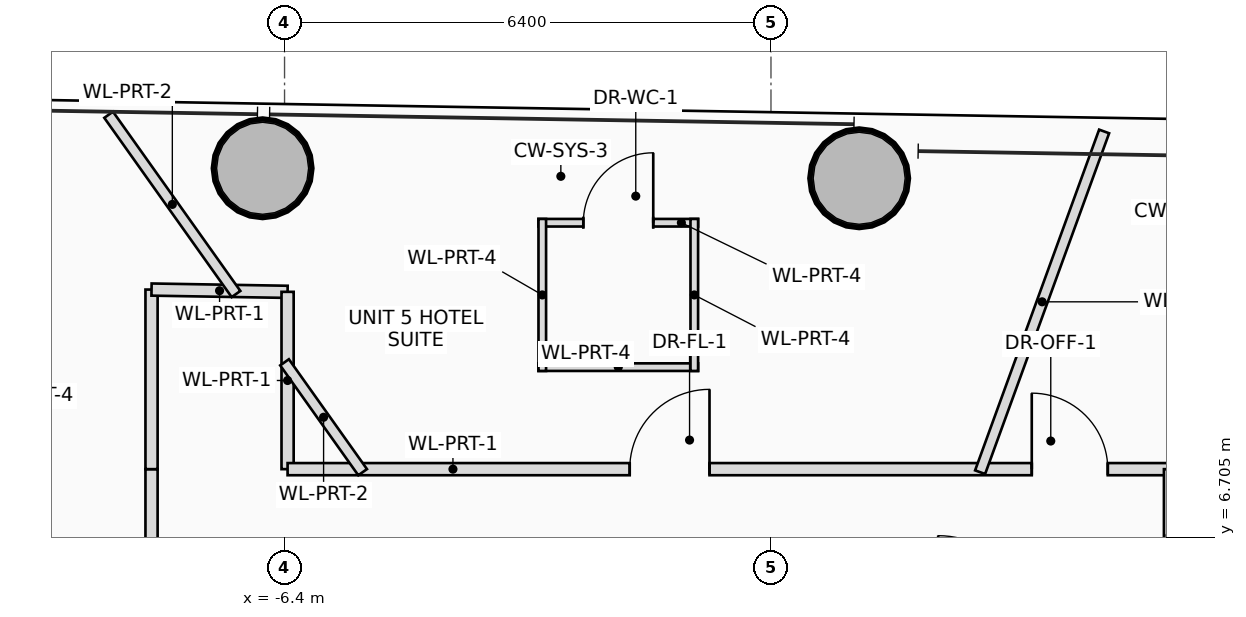
"""IFC4 building model, lengths in metres.
Left out: names, types, materials, properties, quantities, classifications, styles, units other than length and angle.
Written with IfcOpenShell. Run it as: python <this file> out.ifc"""

import sys

from ifc_helpers import new_model, si_unit, direction, frame, frame_2d, origin, origin_2d, place, context, subcontext, project, spatial, rectangle, hollow_circle, extrude, source, transform, mapped, element, fill, save


model = new_model("IFC4")
c1 = context("Model", 3, precision=1e-05, world=origin(), true_north=direction((0.0, 1.0)))
c2 = subcontext(c1, "Body", "Model", "MODEL_VIEW")
j1 = project(units=[si_unit("LENGTHUNIT", "METRE"), si_unit("PLANEANGLEUNIT", "RADIAN")], contexts=[c1])
p1 = place(None, origin())
s1 = spatial("IfcSite", under=j1, at=p1, CompositionType="ELEMENT")
p2 = place(p1, origin())
s2 = spatial("IfcBuilding", under=s1, at=p2, CompositionType="ELEMENT")
p3 = place(p2, frame((0.0, 0.0, 143.3)))
s3 = spatial("IfcBuildingStorey", under=s2, at=p3, CompositionType="ELEMENT", Elevation=143.3)
m1 = source(origin(), c2, "Body", "SweptSolid", [
    extrude(hollow_circle(Radius=0.65, WallThickness=0.045, at=origin_2d()), origin(), (0.0, 0.0, 1.0), 3.45),
])
for number, where, z_axis, x_axis in (
    (1, (1.16, 11.427, 0.0), (0.0, 0.0, 1.0), (1.0, 0.0, 0.0)),
    (2, (-6.688, 11.558, 0.0), (0.0, 0.0, 1.0), (1.0, 0.0, 0.0)),
):
    element("IfcColumn", number, at=place(p3, frame(where, z_axis=z_axis, x_axis=x_axis)), inside=s3, PredefinedType="COLUMN", context=c2, shape_type="MappedRepresentation", body=[
        mapped(m1, transform((0.0, 0.0, 0.0), scale=1.0)),
    ])
p4 = place(p3, frame((-3.059, 10.842, 0.0), z_axis=(0.0, 0.0, 1.0), x_axis=(1.0, 0.0, 0.0)))
e3 = element("IfcWall", 3, at=p4, inside=s3, PredefinedType="PARTITIONING", context=c2, shape_type="SweptSolid", body=[
    extrude(rectangle(XDim=2.1, YDim=0.1, at=frame_2d((1.05, 0.0))), origin(), (0.0, 0.0, 1.0), 3.25),
])
p5 = place(p4, frame((0.59, 0.0, 0.0)))
e4 = element("IfcOpeningElement", 4, at=p5, cuts=e3, PredefinedType="OPENING", context=c2, shape_type="SweptSolid", body=[
    extrude(rectangle(XDim=0.92, YDim=2.1, at=frame_2d((0.46, 1.05))), frame((0.0, 0.06, 0.0), z_axis=(0.0, -1.0, 0.0), x_axis=(1.0, 0.0, 0.0)), (0.0, 0.0, 1.0), 0.12),
])
p6 = place(p3, frame((-0.959, 8.942, 0.0), z_axis=(0.0, 0.0, 1.0), x_axis=(-1.0, 0.0, 0.0)))
e5 = element("IfcWall", 5, at=p6, inside=s3, PredefinedType="PARTITIONING", context=c2, shape_type="SweptSolid", body=[
    extrude(rectangle(XDim=2.1, YDim=0.1, at=frame_2d((1.05, 0.0))), origin(), (0.0, 0.0, 1.0), 3.25),
])
for number, where, z_axis, x_axis in (
    (6, (-1.009, 10.892, 0.0), (0.0, 0.0, 1.0), (0.0, -1.0, 0.0)),
    (7, (-3.009, 8.892, 0.0), (0.0, 0.0, 1.0), (0.0, 1.0, 0.0)),
):
    element("IfcWall", number, at=place(p3, frame(where, z_axis=z_axis, x_axis=x_axis)), inside=s3, PredefinedType="PARTITIONING", context=c2, shape_type="SweptSolid", body=[
        extrude(rectangle(XDim=2.0, YDim=0.1, at=frame_2d((1.0, 0.0))), origin(), (0.0, 0.0, 1.0), 2.905),
    ])
p7 = place(p3, frame((-8.15, -7.6, 0.0), z_axis=(0.0, 0.0, 1.0), x_axis=(0.0, 1.0, 0.0)))
e8 = element("IfcWall", 8, at=p7, inside=s3, PredefinedType="PARTITIONING", context=c2, shape_type="SweptSolid", body=[
    extrude(rectangle(XDim=15.2, YDim=0.16, at=frame_2d((7.6, 0.0))), origin(), (0.0, 0.0, 1.0), 2.605),
])
p8 = place(p7, frame((6.538, 0.0, 0.0)))
e9 = element("IfcOpeningElement", 9, at=p8, cuts=e8, PredefinedType="OPENING", context=c2, shape_type="SweptSolid", body=[
    extrude(rectangle(XDim=1.05, YDim=2.2, at=frame_2d((0.525, 1.1))), frame((0.0, 0.09, 0.0), z_axis=(0.0, -1.0, 0.0), x_axis=(1.0, 0.0, 0.0)), (0.0, 0.0, 1.0), 0.18),
])
p9 = place(p7, frame((12.548, 0.0, 0.0)))
e10 = element("IfcOpeningElement", 10, at=p9, cuts=e8, PredefinedType="OPENING", context=c2, shape_type="SweptSolid", body=[
    extrude(rectangle(XDim=1.05, YDim=2.2, at=frame_2d((0.525, 1.1))), frame((0.0, 0.09, 0.0), z_axis=(0.0, -1.0, 0.0), x_axis=(1.0, 0.0, 0.0)), (0.0, 0.0, 1.0), 0.18),
])
p10 = place(p3, frame((-8.15, 7.6, 0.0), z_axis=(0.0, 0.0, 1.0), x_axis=(0.0, 1.0, 0.0)))
e11 = element("IfcWall", 11, at=p10, inside=s3, PredefinedType="PARTITIONING", context=c2, shape_type="SweptSolid", body=[
    extrude(rectangle(XDim=2.363, YDim=0.16, at=frame_2d((1.181, 0.0))), origin(), (0.0, 0.0, 1.0), 2.805),
])
p11 = place(p3, frame((-8.15, 9.963, 0.0), z_axis=(0.0, 0.0, 1.0), x_axis=(0.999859277964, -0.016775704705, 0.0)))
e12 = element("IfcWall", 12, at=p11, inside=s3, PredefinedType="PARTITIONING", context=c2, shape_type="SweptSolid", body=[
    extrude(rectangle(XDim=1.79, YDim=0.16, at=frame_2d((0.895, 0.0))), origin(), (0.0, 0.0, 1.0), 2.605),
])
p12 = place(p3, frame((-6.36, 9.933, 0.0), z_axis=(0.0, 0.0, 1.0), x_axis=(0.0, -1.0, 0.0)))
e13 = element("IfcWall", 13, at=p12, inside=s3, PredefinedType="PARTITIONING", context=c2, shape_type="SweptSolid", body=[
    extrude(rectangle(XDim=2.333, YDim=0.16, at=frame_2d((1.166, 0.0))), origin(), (0.0, 0.0, 1.0), 2.605),
])
p13 = place(p3, frame((-6.36, 7.6, 0.0), z_axis=(0.0, 0.0, 1.0), x_axis=(1.0, 0.0, 0.0)))
e14 = element("IfcWall", 14, at=p13, inside=s3, PredefinedType="PARTITIONING", context=c2, shape_type="SweptSolid", body=[
    extrude(rectangle(XDim=11.61, YDim=0.16, at=frame_2d((5.805, 0.0))), origin(), (0.0, 0.0, 1.0), 2.605),
])
p14 = place(p13, frame((4.501, 0.0, 0.0)))
e15 = element("IfcOpeningElement", 15, at=p14, cuts=e14, PredefinedType="OPENING", context=c2, shape_type="SweptSolid", body=[
    extrude(rectangle(XDim=1.05, YDim=2.2, at=frame_2d((0.525, 1.1))), frame((0.0, 0.09, 0.0), z_axis=(0.0, -1.0, 0.0), x_axis=(1.0, 0.0, 0.0)), (0.0, 0.0, 1.0), 0.18),
])
p15 = place(p13, frame((9.791, 0.0, 0.0)))
e16 = element("IfcOpeningElement", 16, at=p15, cuts=e14, PredefinedType="OPENING", context=c2, shape_type="SweptSolid", body=[
    extrude(rectangle(XDim=1.0, YDim=2.25, at=frame_2d((0.5, 1.125))), frame((0.0, 0.09, 0.0), z_axis=(0.0, -1.0, 0.0), x_axis=(1.0, 0.0, 0.0)), (0.0, 0.0, 1.0), 0.18),
])
p16 = place(p3, frame((5.25, 7.6, 0.0), z_axis=(0.0, 0.0, 1.0), x_axis=(0.0, -1.0, 0.0)))
e17 = element("IfcWall", 17, at=p16, inside=s3, PredefinedType="PARTITIONING", context=c2, shape_type="SweptSolid", body=[
    extrude(rectangle(XDim=1.75, YDim=0.16, at=frame_2d((0.875, 0.0))), origin(), (0.0, 0.0, 1.0), 2.605),
])
p17 = place(p3, frame((2.752, 7.56, 0.0), z_axis=(0.0, 0.0, 1.0), x_axis=(0.342010136434, 0.939696262936, 0.0)))
e18 = element("IfcWall", 18, at=p17, inside=s3, PredefinedType="PARTITIONING", context=c2, shape_type="SweptSolid", body=[
    extrude(rectangle(XDim=4.771, YDim=0.14, at=frame_2d((2.385, 0.0))), origin(), (0.0, 0.0, 1.0), 2.605),
])
p18 = place(p3, frame((-5.373, 7.56, 0.0), z_axis=(0.0, 0.0, 1.0), x_axis=(-0.579296202647, 0.815117114039, 0.0)))
e19 = element("IfcWall", 19, at=p18, inside=s3, PredefinedType="PARTITIONING", context=c2, shape_type="SweptSolid", body=[
    extrude(rectangle(XDim=1.773, YDim=0.14, at=frame_2d((0.887, 0.0))), origin(), (0.0, 0.0, 1.0), 2.605),
])
p19 = place(p3, frame((-7.038, 9.904, 0.0), z_axis=(0.0, 0.0, 1.0), x_axis=(-0.57933697246, 0.815088137775, 0.0)))
e20 = element("IfcWall", 20, at=p19, inside=s3, PredefinedType="PARTITIONING", context=c2, shape_type="SweptSolid", body=[
    extrude(rectangle(XDim=2.893, YDim=0.14, at=frame_2d((1.447, 0.0))), origin(), (0.0, 0.0, 1.0), 2.765),
])
p20 = place(p3, frame((-8.11, 3.476, 0.0), z_axis=(0.0, 0.0, 1.0), x_axis=(-0.919140751836, 0.393929280854, 0.0)))
e21 = element("IfcWall", 21, at=p20, inside=s3, PredefinedType="PARTITIONING", context=c2, shape_type="SweptSolid", body=[
    extrude(rectangle(XDim=11.807, YDim=0.14, at=frame_2d((5.903, 0.0))), origin(), (0.0, 0.0, 1.0), 2.605),
])
p21 = place(p5, origin())
e22 = element("IfcDoor", 22, at=p21, inside=s3, OperationType="SINGLE_SWING_RIGHT", PredefinedType="DOOR", context=c2, shape_type="SweptSolid", body=[
    extrude(rectangle(XDim=0.92, YDim=2.1, at=frame_2d((0.46, 1.05))), frame((0.0, 0.025, 0.0), z_axis=(0.0, -1.0, 0.0), x_axis=(1.0, 0.0, 0.0)), (0.0, 0.0, 1.0), 0.05),
])
fill(e4, e22)
p22 = place(p14, origin())
e23 = element("IfcDoor", 23, at=p22, inside=s3, OperationType="SINGLE_SWING_RIGHT", PredefinedType="DOOR", context=c2, shape_type="SweptSolid", body=[
    extrude(rectangle(XDim=1.05, YDim=2.2, at=frame_2d((0.525, 1.1))), frame((0.0, 0.025, 0.0), z_axis=(0.0, -1.0, 0.0), x_axis=(1.0, 0.0, 0.0)), (0.0, 0.0, 1.0), 0.05),
])
fill(e15, e23)
p23 = place(p15, origin())
e24 = element("IfcDoor", 24, at=p23, inside=s3, OperationType="SINGLE_SWING_LEFT", PredefinedType="DOOR", context=c2, shape_type="SweptSolid", body=[
    extrude(rectangle(XDim=1.0, YDim=2.25, at=frame_2d((0.5, 1.125))), frame((0.0, 0.025, 0.0), z_axis=(0.0, -1.0, 0.0), x_axis=(1.0, 0.0, 0.0)), (0.0, 0.0, 1.0), 0.05),
])
fill(e16, e24)
save(model, sys.argv[1])
